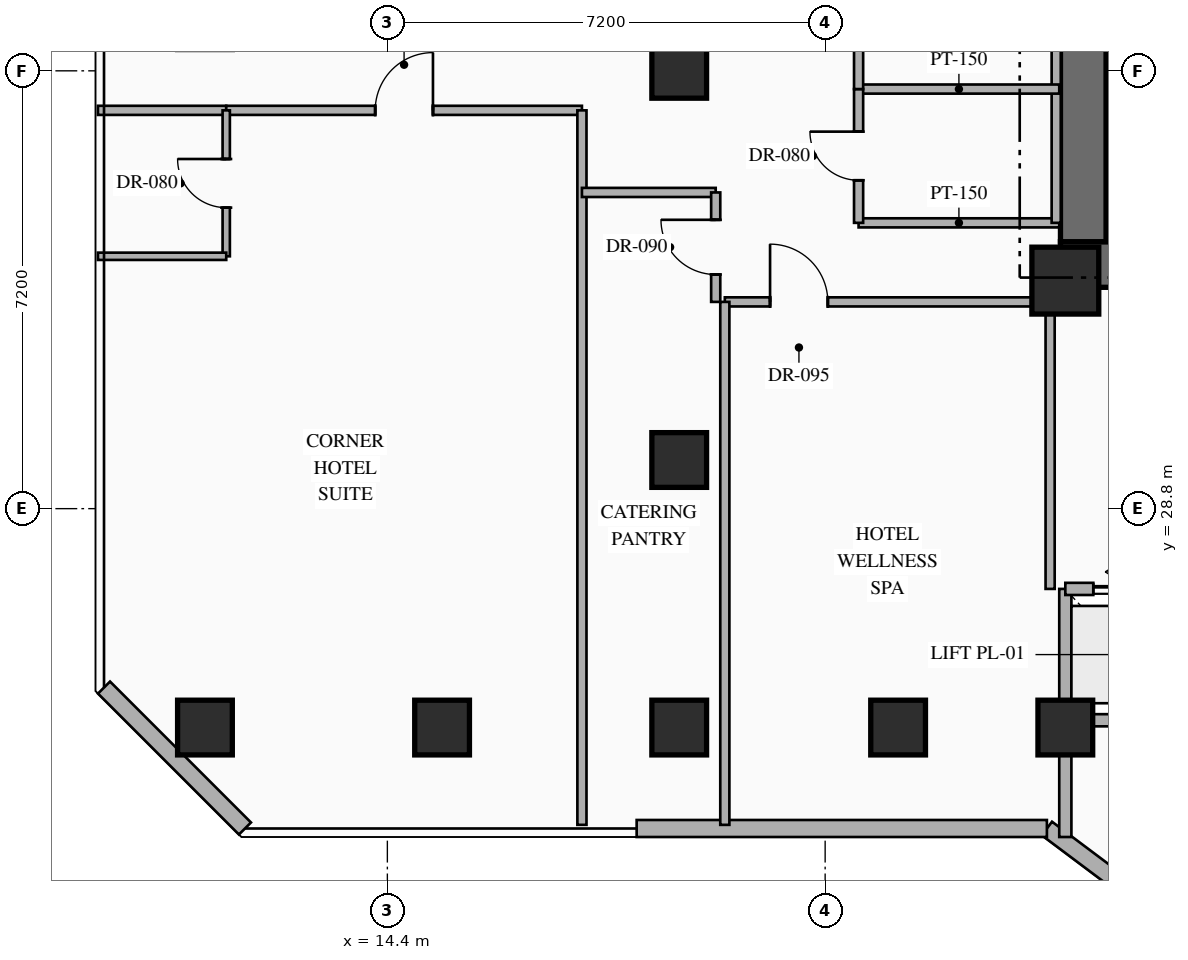
"""IFC4 building model, lengths in metres.
Left out: names, types, materials, properties, quantities, classifications, styles, units other than length and angle.
Written with IfcOpenShell. Run it as: python <this file> out.ifc"""

import sys

from ifc_helpers import new_model, si_unit, direction, frame, frame_2d, origin, origin_2d, place, context, subcontext, project, spatial, rectangle, hollow_rectangle, extrude, element, fill, save


model = new_model("IFC4")
c1 = context("Model", 3, precision=1e-05, world=origin(), true_north=direction((0.0, 1.0)))
c2 = subcontext(c1, "Body", "Model", "MODEL_VIEW")
j1 = project(units=[si_unit("LENGTHUNIT", "METRE"), si_unit("PLANEANGLEUNIT", "RADIAN")], contexts=[c1])
p1 = place(None, origin())
s1 = spatial("IfcSite", under=j1, at=p1, CompositionType="ELEMENT")
p2 = place(p1, origin())
s2 = spatial("IfcBuilding", under=s1, at=p2, CompositionType="ELEMENT")
p3 = place(p2, frame((0.0, 0.0, 74.6)))
s3 = spatial("IfcBuildingStorey", under=s2, at=p3, CompositionType="ELEMENT", Elevation=74.6)
p4 = place(p3, frame((25.47, 32.815, 0.0), z_axis=(0.0, 0.0, 1.0), x_axis=(1.0, 0.0, 0.0)))
e1 = element("IfcWall", 1, at=p4, inside=s3, PredefinedType="SHEAR", context=c2, shape_type="SweptSolid", body=[
    extrude(rectangle(XDim=8.08, YDim=0.75, at=frame_2d((4.04, 0.0))), origin(), (0.0, 0.0, 1.0), 3.35),
])
p5 = place(p4, frame((2.98, 0.0, 0.0)))
e2 = element("IfcOpeningElement", 2, at=p5, cuts=e1, PredefinedType="OPENING", context=c2, shape_type="SweptSolid", body=[
    extrude(rectangle(XDim=1.1, YDim=2.2, at=frame_2d((0.55, 1.1))), frame((0.0, 0.385, 0.0), z_axis=(0.0, -1.0, 0.0), x_axis=(1.0, 0.0, 0.0)), (0.0, 0.0, 1.0), 0.77),
])
p6 = place(p4, frame((5.73, 0.0, 0.0)))
e3 = element("IfcOpeningElement", 3, at=p6, cuts=e1, PredefinedType="OPENING", context=c2, shape_type="SweptSolid", body=[
    extrude(rectangle(XDim=1.1, YDim=2.15, at=frame_2d((0.55, 1.075))), frame((0.0, 0.385, 0.0), z_axis=(0.0, -1.0, 0.0), x_axis=(1.0, 0.0, 0.0)), (0.0, 0.0, 1.0), 0.77),
])
p7 = place(p3, frame((25.845, 33.19, 0.0), z_axis=(0.0, 0.0, 1.0), x_axis=(0.0, 1.0, 0.0)))
e4 = element("IfcWall", 4, at=p7, inside=s3, PredefinedType="SHEAR", context=c2, shape_type="SweptSolid", body=[
    extrude(rectangle(XDim=9.48, YDim=0.75, at=frame_2d((4.74, 0.0))), origin(), (0.0, 0.0, 1.0), 3.35),
])
p8 = place(p3, frame((25.55, 32.55, 0.0), z_axis=(0.0, 0.0, 1.0), x_axis=(1.0, 0.0, 0.0)))
e5 = element("IfcColumn", 5, at=p8, inside=s3, PredefinedType="COLUMN", context=c2, shape_type="SweptSolid", body=[
    extrude(rectangle(XDim=1.1, YDim=1.1, at=origin_2d()), origin(), (0.0, 0.0, 1.0), 3.35),
])
for number, where, z_axis, x_axis in (
    (6, (25.55, 25.2, 0.0), (0.0, 0.0, 1.0), (1.0, 0.0, 0.0)),
    (7, (11.4, 25.2, 0.0), (0.0, 0.0, 1.0), (1.0, 0.0, 0.0)),
    (8, (19.2, 25.2, 0.0), (0.0, 0.0, 1.0), (1.0, 0.0, 0.0)),
    (9, (19.2, 29.6, 0.0), (0.0, 0.0, 1.0), (1.0, 0.0, 0.0)),
    (10, (22.8, 25.2, 0.0), (0.0, 0.0, 1.0), (1.0, 0.0, 0.0)),
    (11, (19.2, 36.0, 0.0), (0.0, 0.0, 1.0), (1.0, 0.0, 0.0)),
    (12, (15.3, 25.2, 0.0), (0.0, 0.0, 1.0), (1.0, 0.0, 0.0)),
):
    element("IfcColumn", number, at=place(p3, frame(where, z_axis=z_axis, x_axis=x_axis)), inside=s3, PredefinedType="COLUMN", context=c2, shape_type="SweptSolid", body=[
        extrude(hollow_rectangle(XDim=0.9, YDim=0.9, WallThickness=0.036, at=origin_2d()), origin(), (0.0, 0.0, 1.0), 3.35),
    ])
p9 = place(p3, frame((53.318, 2.487, 0.0), z_axis=(0.0, 0.0, 1.0), x_axis=(-0.800004174678, 0.599994433723, 0.0)))
e13 = element("IfcWall", 13, at=p9, inside=s3, PredefinedType="STANDARD", context=c2, shape_type="SweptSolid", body=[
    extrude(rectangle(XDim=35.089, YDim=0.28, at=frame_2d((17.544, 0.0))), origin(), (0.0, 0.0, 1.0), 3.13),
])
p10 = place(p9, frame((1.931, 0.0, 0.85)))
e14 = element("IfcOpeningElement", 14, at=p10, cuts=e13, PredefinedType="OPENING", context=c2, shape_type="SweptSolid", body=[
    extrude(rectangle(XDim=1.4, YDim=1.8, at=frame_2d((0.7, 0.9))), frame((0.0, 0.15, 0.0), z_axis=(0.0, -1.0, 0.0), x_axis=(1.0, 0.0, 0.0)), (0.0, 0.0, 1.0), 0.3),
])
p11 = place(p9, frame((6.819, 0.0, 0.85)))
e15 = element("IfcOpeningElement", 15, at=p11, cuts=e13, PredefinedType="OPENING", context=c2, shape_type="SweptSolid", body=[
    extrude(rectangle(XDim=1.4, YDim=1.8, at=frame_2d((0.7, 0.9))), frame((0.0, 0.15, 0.0), z_axis=(0.0, -1.0, 0.0), x_axis=(1.0, 0.0, 0.0)), (0.0, 0.0, 1.0), 0.3),
])
p12 = place(p9, frame((11.832, 0.0, 0.85)))
e16 = element("IfcOpeningElement", 16, at=p12, cuts=e13, PredefinedType="OPENING", context=c2, shape_type="SweptSolid", body=[
    extrude(rectangle(XDim=1.4, YDim=1.8, at=frame_2d((0.7, 0.9))), frame((0.0, 0.15, 0.0), z_axis=(0.0, -1.0, 0.0), x_axis=(1.0, 0.0, 0.0)), (0.0, 0.0, 1.0), 0.3),
])
p13 = place(p9, frame((17.647, 0.0, 0.85)))
e17 = element("IfcOpeningElement", 17, at=p13, cuts=e13, PredefinedType="OPENING", context=c2, shape_type="SweptSolid", body=[
    extrude(rectangle(XDim=1.4, YDim=1.8, at=frame_2d((0.7, 0.9))), frame((0.0, 0.15, 0.0), z_axis=(0.0, -1.0, 0.0), x_axis=(1.0, 0.0, 0.0)), (0.0, 0.0, 1.0), 0.3),
])
p14 = place(p9, frame((21.857, 0.0, 0.85)))
e18 = element("IfcOpeningElement", 18, at=p14, cuts=e13, PredefinedType="OPENING", context=c2, shape_type="SweptSolid", body=[
    extrude(rectangle(XDim=1.4, YDim=1.8, at=frame_2d((0.7, 0.9))), frame((0.0, 0.15, 0.0), z_axis=(0.0, -1.0, 0.0), x_axis=(1.0, 0.0, 0.0)), (0.0, 0.0, 1.0), 0.3),
])
p15 = place(p9, frame((26.87, 0.0, 0.85)))
e19 = element("IfcOpeningElement", 19, at=p15, cuts=e13, PredefinedType="OPENING", context=c2, shape_type="SweptSolid", body=[
    extrude(rectangle(XDim=1.4, YDim=1.8, at=frame_2d((0.7, 0.9))), frame((0.0, 0.15, 0.0), z_axis=(0.0, -1.0, 0.0), x_axis=(1.0, 0.0, 0.0)), (0.0, 0.0, 1.0), 0.3),
])
p16 = place(p9, frame((31.757, 0.0, 0.85)))
e20 = element("IfcOpeningElement", 20, at=p16, cuts=e13, PredefinedType="OPENING", context=c2, shape_type="SweptSolid", body=[
    extrude(rectangle(XDim=1.4, YDim=1.8, at=frame_2d((0.7, 0.9))), frame((0.0, 0.15, 0.0), z_axis=(0.0, -1.0, 0.0), x_axis=(1.0, 0.0, 0.0)), (0.0, 0.0, 1.0), 0.3),
])
p17 = place(p3, frame((25.247, 23.54, 0.0), z_axis=(0.0, 0.0, 1.0), x_axis=(-1.0, 0.0, 0.0)))
e21 = element("IfcWall", 21, at=p17, inside=s3, PredefinedType="STANDARD", context=c2, shape_type="SweptSolid", body=[
    extrude(rectangle(XDim=6.747, YDim=0.28, at=frame_2d((3.374, 0.0))), origin(), (0.0, 0.0, 1.0), 3.13),
])
p18 = place(p3, frame((12.058, 23.54, 0.0), z_axis=(0.0, 0.0, 1.0), x_axis=(-0.707144017911, 0.707069542501, 0.0)))
e22 = element("IfcWall", 22, at=p18, inside=s3, PredefinedType="STANDARD", context=c2, shape_type="SweptSolid", body=[
    extrude(rectangle(XDim=3.278, YDim=0.28, at=frame_2d((1.639, 0.0))), origin(), (0.0, 0.0, 1.0), 3.13),
])
p19 = place(p3, frame((25.55, 23.4, 0.0), z_axis=(0.0, 0.0, 1.0), x_axis=(0.0, 1.0, 0.0)))
e23 = element("IfcWall", 23, at=p19, inside=s3, PredefinedType="STANDARD", context=c2, shape_type="SweptSolid", body=[
    extrude(rectangle(XDim=4.08, YDim=0.2, at=frame_2d((2.04, 0.0))), origin(), (0.0, 0.0, 1.0), 2.425),
])
p20 = place(p3, frame((25.55, 25.32, 0.0), z_axis=(0.0, 0.0, 1.0), x_axis=(1.0, 0.0, 0.0)))
e24 = element("IfcWall", 24, at=p20, inside=s3, PredefinedType="STANDARD", context=c2, shape_type="SweptSolid", body=[
    extrude(rectangle(XDim=7.88, YDim=0.2, at=frame_2d((3.94, 0.0))), origin(), (0.0, 0.0, 1.0), 2.525),
])
p21 = place(p3, frame((25.55, 27.48, 0.0), z_axis=(0.0, 0.0, 1.0), x_axis=(1.0, 0.0, 0.0)))
e25 = element("IfcWall", 25, at=p21, inside=s3, PredefinedType="STANDARD", context=c2, shape_type="SweptSolid", body=[
    extrude(rectangle(XDim=7.88, YDim=0.2, at=frame_2d((3.94, 0.0))), origin(), (0.0, 0.0, 1.0), 3.13),
])
p22 = place(p21, frame((0.46, 0.0, 0.0)))
e26 = element("IfcOpeningElement", 26, at=p22, cuts=e25, PredefinedType="OPENING", context=c2, shape_type="SweptSolid", body=[
    extrude(rectangle(XDim=1.08, YDim=2.15, at=frame_2d((0.54, 1.075))), frame((0.0, 0.11, 0.0), z_axis=(0.0, -1.0, 0.0), x_axis=(1.0, 0.0, 0.0)), (0.0, 0.0, 1.0), 0.22),
])
p23 = place(p21, frame((2.42, 0.0, 0.0)))
e27 = element("IfcOpeningElement", 27, at=p23, cuts=e25, PredefinedType="OPENING", context=c2, shape_type="SweptSolid", body=[
    extrude(rectangle(XDim=1.08, YDim=2.15, at=frame_2d((0.54, 1.075))), frame((0.0, 0.11, 0.0), z_axis=(0.0, -1.0, 0.0), x_axis=(1.0, 0.0, 0.0)), (0.0, 0.0, 1.0), 0.22),
])
p24 = place(p21, frame((4.38, 0.0, 0.0)))
e28 = element("IfcOpeningElement", 28, at=p24, cuts=e25, PredefinedType="OPENING", context=c2, shape_type="SweptSolid", body=[
    extrude(rectangle(XDim=1.08, YDim=2.15, at=frame_2d((0.54, 1.075))), frame((0.0, 0.11, 0.0), z_axis=(0.0, -1.0, 0.0), x_axis=(1.0, 0.0, 0.0)), (0.0, 0.0, 1.0), 0.22),
])
p25 = place(p21, frame((6.34, 0.0, 0.0)))
e29 = element("IfcOpeningElement", 29, at=p25, cuts=e25, PredefinedType="OPENING", context=c2, shape_type="SweptSolid", body=[
    extrude(rectangle(XDim=1.08, YDim=2.15, at=frame_2d((0.54, 1.075))), frame((0.0, 0.11, 0.0), z_axis=(0.0, -1.0, 0.0), x_axis=(1.0, 0.0, 0.0)), (0.0, 0.0, 1.0), 0.22),
])
p26 = place(p3, frame((22.15, 33.5, 0.0), z_axis=(0.0, 0.0, 1.0), x_axis=(1.0, 0.0, 0.0)))
e30 = element("IfcWall", 30, at=p26, inside=s3, PredefinedType="PARTITIONING", context=c2, shape_type="SweptSolid", body=[
    extrude(rectangle(XDim=3.3, YDim=0.15, at=frame_2d((1.65, 0.0))), origin(), (0.0, 0.0, 1.0), 3.13),
])
p27 = place(p3, frame((25.4, 33.5, 0.0), z_axis=(0.0, 0.0, 1.0), x_axis=(0.0, 1.0, 0.0)))
e31 = element("IfcWall", 31, at=p27, inside=s3, PredefinedType="PARTITIONING", context=c2, shape_type="SweptSolid", body=[
    extrude(rectangle(XDim=6.6, YDim=0.15, at=frame_2d((3.3, 0.0))), origin(), (0.0, 0.0, 1.0), 3.13),
])
p28 = place(p3, frame((22.15, 35.7, 0.0), z_axis=(0.0, 0.0, 1.0), x_axis=(1.0, 0.0, 0.0)))
e32 = element("IfcWall", 32, at=p28, inside=s3, PredefinedType="PARTITIONING", context=c2, shape_type="SweptSolid", body=[
    extrude(rectangle(XDim=3.3, YDim=0.15, at=frame_2d((1.65, 0.0))), origin(), (0.0, 0.0, 1.0), 3.13),
])
p29 = place(p3, frame((22.15, 33.5, 0.0), z_axis=(0.0, 0.0, 1.0), x_axis=(0.0, 1.0, 0.0)))
e33 = element("IfcWall", 33, at=p29, inside=s3, PredefinedType="PARTITIONING", context=c2, shape_type="SweptSolid", body=[
    extrude(rectangle(XDim=2.2, YDim=0.15, at=frame_2d((1.1, 0.0))), origin(), (0.0, 0.0, 1.0), 3.13),
])
p30 = place(p29, frame((0.7, 0.0, 0.0)))
e34 = element("IfcOpeningElement", 34, at=p30, cuts=e33, PredefinedType="OPENING", context=c2, shape_type="SweptSolid", body=[
    extrude(rectangle(XDim=0.8, YDim=2.06, at=frame_2d((0.4, 1.03))), frame((0.0, 0.085, 0.0), z_axis=(0.0, -1.0, 0.0), x_axis=(1.0, 0.0, 0.0)), (0.0, 0.0, 1.0), 0.17),
])
p31 = place(p3, frame((22.15, 35.7, 0.0), z_axis=(0.0, 0.0, 1.0), x_axis=(0.0, 1.0, 0.0)))
e35 = element("IfcWall", 35, at=p31, inside=s3, PredefinedType="PARTITIONING", context=c2, shape_type="SweptSolid", body=[
    extrude(rectangle(XDim=2.2, YDim=0.15, at=frame_2d((1.1, 0.0))), origin(), (0.0, 0.0, 1.0), 3.13),
])
p32 = place(p31, frame((0.7, 0.0, 0.0)))
e36 = element("IfcOpeningElement", 36, at=p32, cuts=e35, PredefinedType="OPENING", context=c2, shape_type="SweptSolid", body=[
    extrude(rectangle(XDim=0.8, YDim=2.06, at=frame_2d((0.4, 1.03))), frame((0.0, 0.085, 0.0), z_axis=(0.0, -1.0, 0.0), x_axis=(1.0, 0.0, 0.0)), (0.0, 0.0, 1.0), 0.17),
])
p33 = place(p3, frame((19.95, 32.2, 0.0), z_axis=(0.0, 0.0, 1.0), x_axis=(1.0, 0.0, 0.0)))
e37 = element("IfcWall", 37, at=p33, inside=s3, PredefinedType="PARTITIONING", context=c2, shape_type="SweptSolid", body=[
    extrude(rectangle(XDim=5.35, YDim=0.15, at=frame_2d((2.675, 0.0))), origin(), (0.0, 0.0, 1.0), 3.13),
])
p34 = place(p33, frame((0.744, 0.0, 0.0)))
e38 = element("IfcOpeningElement", 38, at=p34, cuts=e37, PredefinedType="OPENING", context=c2, shape_type="SweptSolid", body=[
    extrude(rectangle(XDim=0.95, YDim=2.15, at=frame_2d((0.475, 1.075))), frame((0.0, 0.085, 0.0), z_axis=(0.0, -1.0, 0.0), x_axis=(1.0, 0.0, 0.0)), (0.0, 0.0, 1.0), 0.17),
])
p35 = place(p3, frame((19.95, 23.6, 0.0), z_axis=(0.0, 0.0, 1.0), x_axis=(0.0, 1.0, 0.0)))
e39 = element("IfcWall", 39, at=p35, inside=s3, PredefinedType="PARTITIONING", context=c2, shape_type="SweptSolid", body=[
    extrude(rectangle(XDim=8.6, YDim=0.15, at=frame_2d((4.3, 0.0))), origin(), (0.0, 0.0, 1.0), 3.13),
])
p36 = place(p3, frame((25.3, 27.48, 0.0), z_axis=(0.0, 0.0, 1.0), x_axis=(0.0, 1.0, 0.0)))
e40 = element("IfcWall", 40, at=p36, inside=s3, PredefinedType="PARTITIONING", context=c2, shape_type="SweptSolid", body=[
    extrude(rectangle(XDim=4.72, YDim=0.15, at=frame_2d((2.36, 0.0))), origin(), (0.0, 0.0, 1.0), 2.425),
])
p37 = place(p3, frame((9.64, 35.35, 0.0), z_axis=(0.0, 0.0, 1.0), x_axis=(1.0, 0.0, 0.0)))
e41 = element("IfcWall", 41, at=p37, inside=s3, PredefinedType="PARTITIONING", context=c2, shape_type="SweptSolid", body=[
    extrude(rectangle(XDim=2.11, YDim=0.15, at=frame_2d((1.055, 0.0))), origin(), (0.0, 0.0, 1.0), 3.13),
])
p38 = place(p3, frame((11.75, 35.35, 0.0), z_axis=(0.0, 0.0, 1.0), x_axis=(1.0, 0.0, 0.0)))
e42 = element("IfcWall", 42, at=p38, inside=s3, PredefinedType="PARTITIONING", context=c2, shape_type="SweptSolid", body=[
    extrude(rectangle(XDim=5.85, YDim=0.15, at=frame_2d((2.925, 0.0))), origin(), (0.0, 0.0, 1.0), 3.13),
])
p39 = place(p38, frame((2.45, 0.0, 0.0)))
e43 = element("IfcOpeningElement", 43, at=p39, cuts=e42, PredefinedType="OPENING", context=c2, shape_type="SweptSolid", body=[
    extrude(rectangle(XDim=0.95, YDim=2.15, at=frame_2d((0.475, 1.075))), frame((0.0, 0.085, 0.0), z_axis=(0.0, -1.0, 0.0), x_axis=(1.0, 0.0, 0.0)), (0.0, 0.0, 1.0), 0.17),
])
p40 = place(p3, frame((11.75, 32.95, 0.0), z_axis=(0.0, 0.0, 1.0), x_axis=(0.0, 1.0, 0.0)))
e44 = element("IfcWall", 44, at=p40, inside=s3, PredefinedType="PARTITIONING", context=c2, shape_type="SweptSolid", body=[
    extrude(rectangle(XDim=2.4, YDim=0.12, at=frame_2d((1.2, 0.0))), origin(), (0.0, 0.0, 1.0), 3.13),
])
p41 = place(p40, frame((0.8, 0.0, 0.0)))
e45 = element("IfcOpeningElement", 45, at=p41, cuts=e44, PredefinedType="OPENING", context=c2, shape_type="SweptSolid", body=[
    extrude(rectangle(XDim=0.8, YDim=2.06, at=frame_2d((0.4, 1.03))), frame((0.0, 0.07, 0.0), z_axis=(0.0, -1.0, 0.0), x_axis=(1.0, 0.0, 0.0)), (0.0, 0.0, 1.0), 0.14),
])
p42 = place(p3, frame((9.64, 32.95, 0.0), z_axis=(0.0, 0.0, 1.0), x_axis=(1.0, 0.0, 0.0)))
e46 = element("IfcWall", 46, at=p42, inside=s3, PredefinedType="PARTITIONING", context=c2, shape_type="SweptSolid", body=[
    extrude(rectangle(XDim=2.11, YDim=0.12, at=frame_2d((1.055, 0.0))), origin(), (0.0, 0.0, 1.0), 3.13),
])
p43 = place(p3, frame((17.6, 23.6, 0.0), z_axis=(0.0, 0.0, 1.0), x_axis=(0.0, 1.0, 0.0)))
e47 = element("IfcWall", 47, at=p43, inside=s3, PredefinedType="PARTITIONING", context=c2, shape_type="SweptSolid", body=[
    extrude(rectangle(XDim=11.75, YDim=0.15, at=frame_2d((5.875, 0.0))), origin(), (0.0, 0.0, 1.0), 3.13),
])
p44 = place(p3, frame((17.6, 34.0, 0.0), z_axis=(0.0, 0.0, 1.0), x_axis=(1.0, 0.0, 0.0)))
e48 = element("IfcWall", 48, at=p44, inside=s3, PredefinedType="PARTITIONING", context=c2, shape_type="SweptSolid", body=[
    extrude(rectangle(XDim=2.2, YDim=0.15, at=frame_2d((1.1, 0.0))), origin(), (0.0, 0.0, 1.0), 3.13),
])
p45 = place(p3, frame((19.8, 32.2, 0.0), z_axis=(0.0, 0.0, 1.0), x_axis=(0.0, 1.0, 0.0)))
e49 = element("IfcWall", 49, at=p45, inside=s3, PredefinedType="PARTITIONING", context=c2, shape_type="SweptSolid", body=[
    extrude(rectangle(XDim=1.8, YDim=0.15, at=frame_2d((0.9, 0.0))), origin(), (0.0, 0.0, 1.0), 3.13),
])
p46 = place(p45, frame((0.45, 0.0, 0.0)))
e50 = element("IfcOpeningElement", 50, at=p46, cuts=e49, PredefinedType="OPENING", context=c2, shape_type="SweptSolid", body=[
    extrude(rectangle(XDim=0.9, YDim=2.15, at=frame_2d((0.45, 1.075))), frame((0.0, 0.085, 0.0), z_axis=(0.0, -1.0, 0.0), x_axis=(1.0, 0.0, 0.0)), (0.0, 0.0, 1.0), 0.17),
])
p47 = place(p22, origin())
e51 = element("IfcDoor", 51, at=p47, inside=s3, OperationType="SLIDING_TO_LEFT", PredefinedType="USERDEFINED", context=c2, shape_type="SweptSolid", body=[
    extrude(rectangle(XDim=1.08, YDim=2.15, at=frame_2d((0.54, 1.075))), frame((0.0, 0.025, 0.0), z_axis=(0.0, -1.0, 0.0), x_axis=(1.0, 0.0, 0.0)), (0.0, 0.0, 1.0), 0.05),
])
fill(e26, e51)
p48 = place(p30, origin())
e52 = element("IfcDoor", 52, at=p48, inside=s3, OperationType="SINGLE_SWING_RIGHT", PredefinedType="DOOR", context=c2, shape_type="SweptSolid", body=[
    extrude(rectangle(XDim=0.8, YDim=2.06, at=frame_2d((0.4, 1.03))), frame((0.0, 0.025, 0.0), z_axis=(0.0, -1.0, 0.0), x_axis=(1.0, 0.0, 0.0)), (0.0, 0.0, 1.0), 0.05),
])
fill(e34, e52)
p49 = place(p34, origin())
e53 = element("IfcDoor", 53, at=p49, inside=s3, OperationType="SINGLE_SWING_LEFT", PredefinedType="DOOR", context=c2, shape_type="SweptSolid", body=[
    extrude(rectangle(XDim=0.95, YDim=2.15, at=frame_2d((0.475, 1.075))), frame((0.0, 0.025, 0.0), z_axis=(0.0, -1.0, 0.0), x_axis=(1.0, 0.0, 0.0)), (0.0, 0.0, 1.0), 0.05),
])
fill(e38, e53)
p50 = place(p39, origin())
e54 = element("IfcDoor", 54, at=p50, inside=s3, OperationType="SINGLE_SWING_RIGHT", PredefinedType="DOOR", context=c2, shape_type="SweptSolid", body=[
    extrude(rectangle(XDim=0.95, YDim=2.15, at=frame_2d((0.475, 1.075))), frame((0.0, 0.025, 0.0), z_axis=(0.0, -1.0, 0.0), x_axis=(1.0, 0.0, 0.0)), (0.0, 0.0, 1.0), 0.05),
])
fill(e43, e54)
p51 = place(p41, origin())
e55 = element("IfcDoor", 55, at=p51, inside=s3, OperationType="SINGLE_SWING_RIGHT", PredefinedType="DOOR", context=c2, shape_type="SweptSolid", body=[
    extrude(rectangle(XDim=0.8, YDim=2.06, at=frame_2d((0.4, 1.03))), frame((0.0, 0.025, 0.0), z_axis=(0.0, -1.0, 0.0), x_axis=(1.0, 0.0, 0.0)), (0.0, 0.0, 1.0), 0.05),
])
fill(e45, e55)
p52 = place(p46, origin())
e56 = element("IfcDoor", 56, at=p52, inside=s3, OperationType="SINGLE_SWING_RIGHT", PredefinedType="DOOR", context=c2, shape_type="SweptSolid", body=[
    extrude(rectangle(XDim=0.9, YDim=2.15, at=frame_2d((0.45, 1.075))), frame((0.0, 0.025, 0.0), z_axis=(0.0, -1.0, 0.0), x_axis=(1.0, 0.0, 0.0)), (0.0, 0.0, 1.0), 0.05),
])
fill(e50, e56)
save(model, sys.argv[1])
